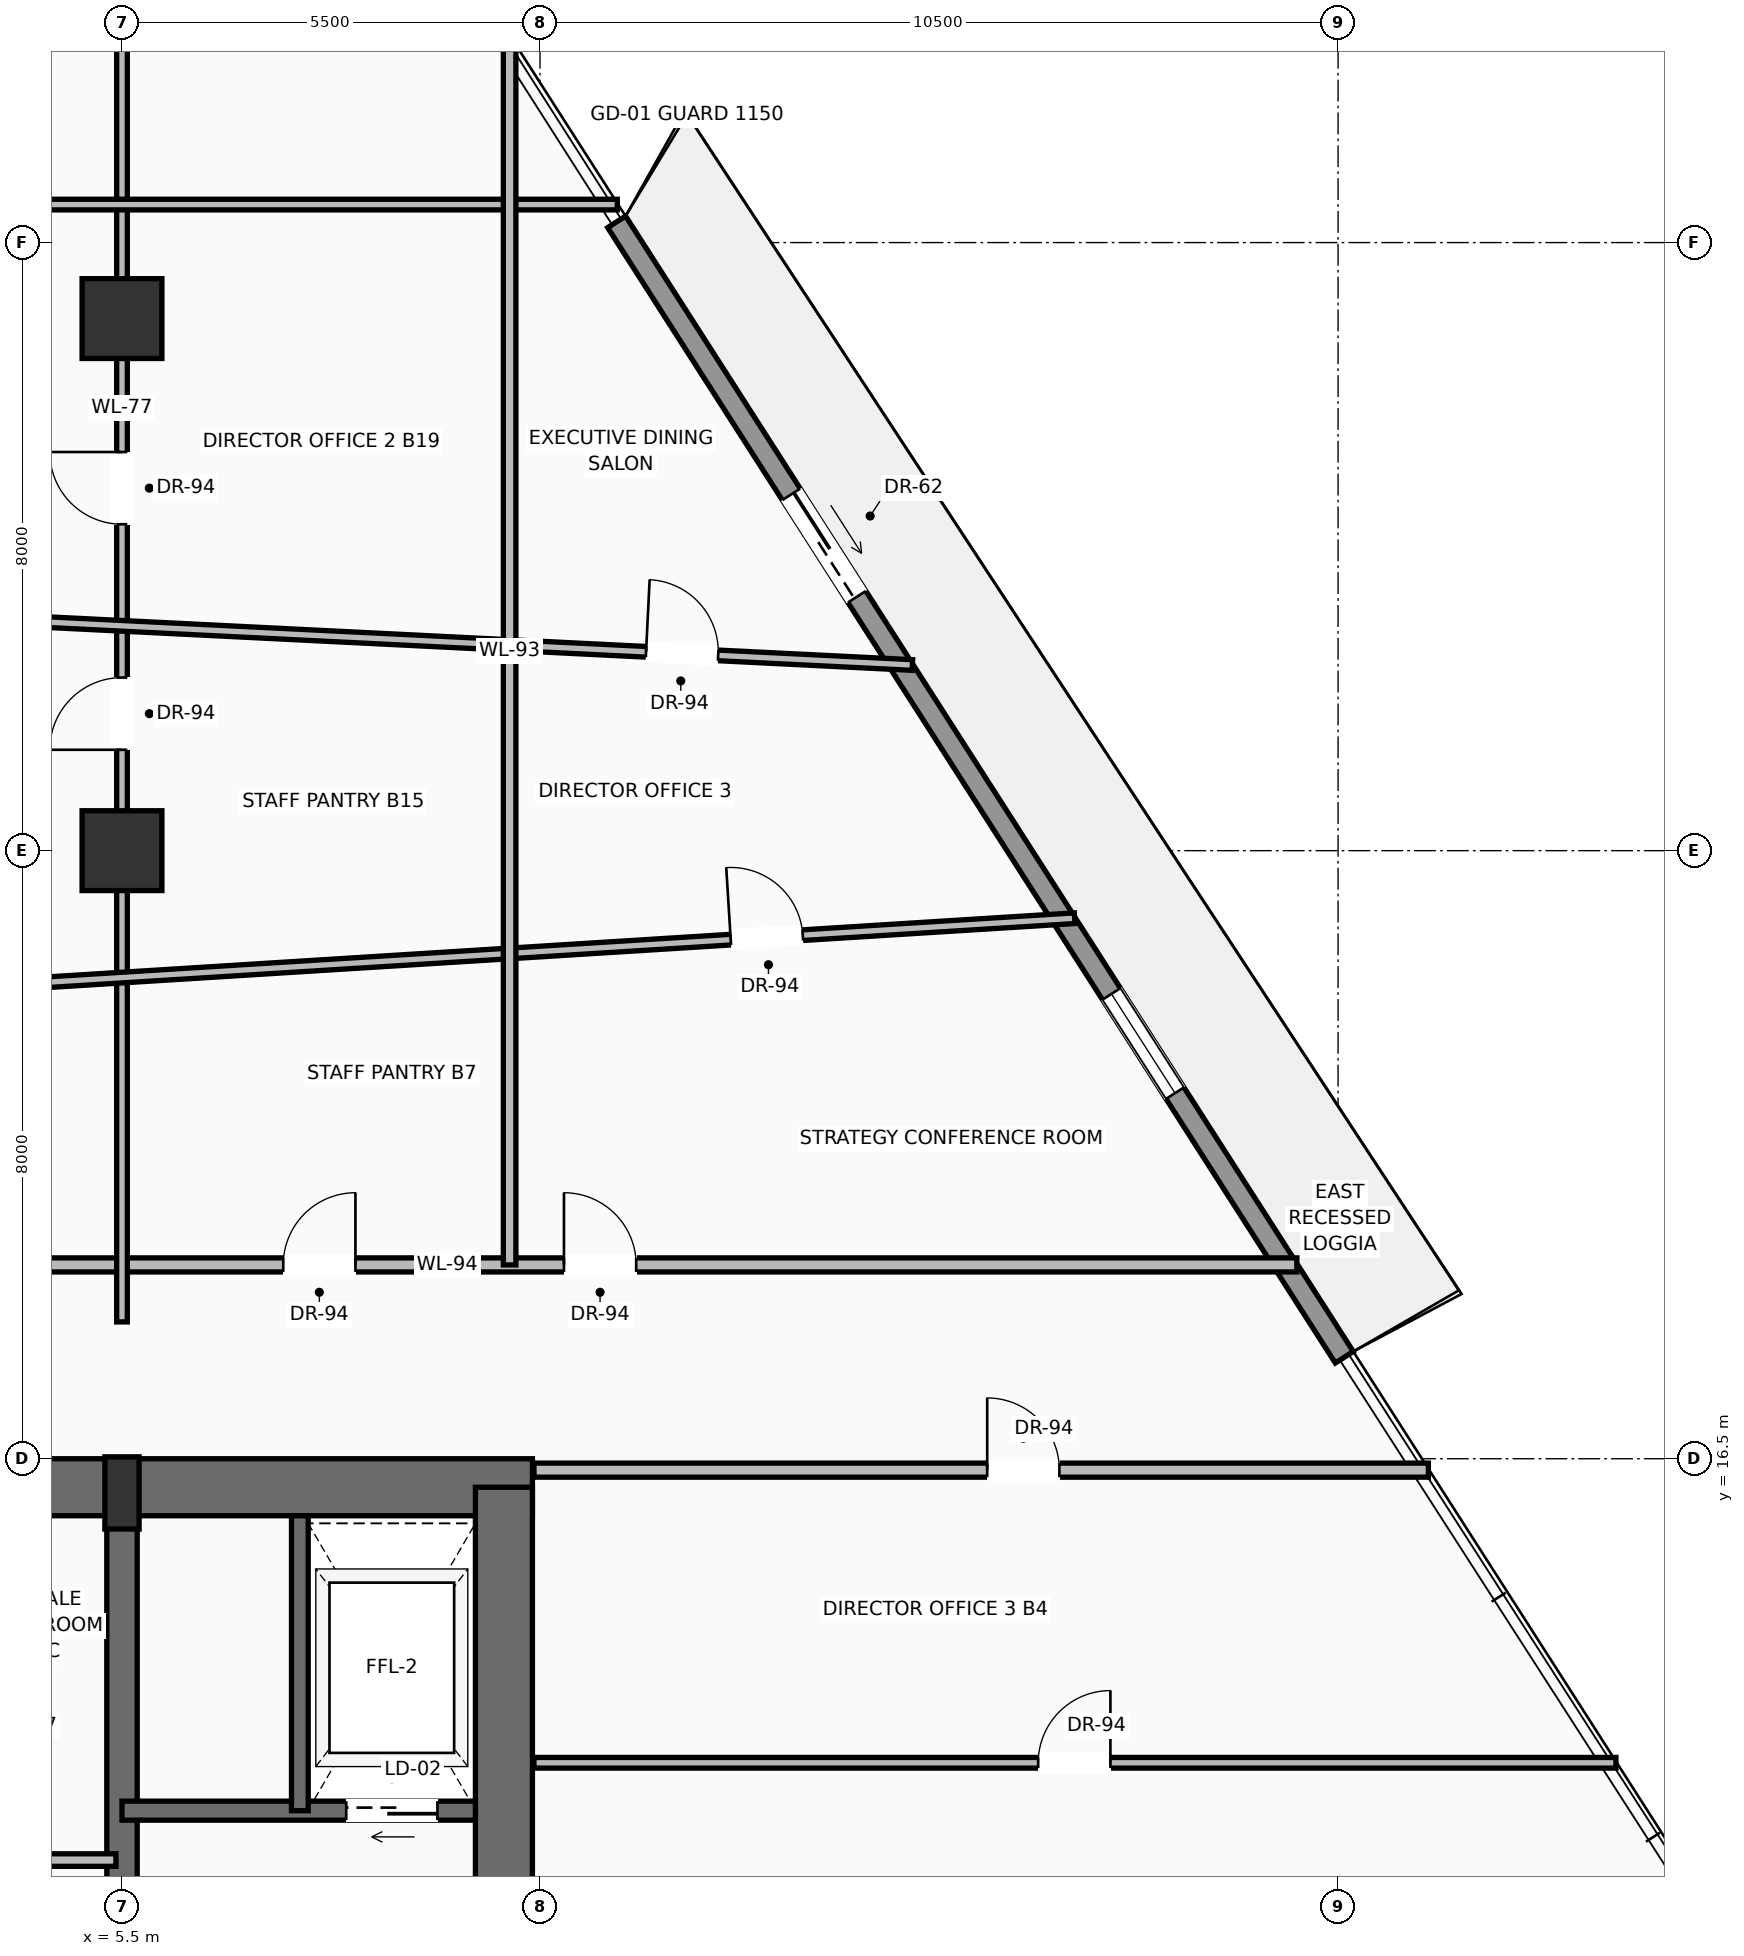
"""IFC4 building model, lengths in metres.
Left out: names, types, materials, properties, quantities, classifications, styles, units other than length and angle.
Written with IfcOpenShell. Run it as: python <this file> out.ifc"""

import sys

from ifc_helpers import new_model, si_unit, direction, frame, frame_2d, origin, origin_2d, place, context, subcontext, project, spatial, rectangle, extrude, source, transform, mapped, element, fill, save


model = new_model("IFC4")
c1 = context("Model", 3, precision=1e-05, world=origin(), true_north=direction((0.0, 1.0)))
c2 = subcontext(c1, "Body", "Model", "MODEL_VIEW")
j1 = project(units=[si_unit("LENGTHUNIT", "METRE"), si_unit("PLANEANGLEUNIT", "RADIAN")], contexts=[c1])
p1 = place(None, origin())
s1 = spatial("IfcSite", under=j1, at=p1, CompositionType="ELEMENT")
p2 = place(p1, origin())
s2 = spatial("IfcBuilding", under=s1, at=p2, CompositionType="ELEMENT")
p3 = place(p2, frame((0.0, 0.0, 117.3)))
s3 = spatial("IfcBuildingStorey", under=s2, at=p3, CompositionType="ELEMENT", Elevation=117.3)
p4 = place(p3, frame((-10.9, 16.125, 0.0), z_axis=(0.0, 0.0, 1.0), x_axis=(1.0, 0.0, 0.0)))
e1 = element("IfcWall", 1, at=p4, inside=s3, PredefinedType="SHEAR", context=c2, shape_type="SweptSolid", body=[
    extrude(rectangle(XDim=21.8, YDim=0.75, at=frame_2d((10.9, 0.0))), origin(), (0.0, 0.0, 1.0), 3.42),
])
p5 = place(p4, frame((3.47, 0.0, 0.0)))
e2 = element("IfcOpeningElement", 2, at=p5, cuts=e1, PredefinedType="OPENING", context=c2, shape_type="SweptSolid", body=[
    extrude(rectangle(XDim=1.3, YDim=2.3, at=frame_2d((0.65, 1.15))), frame((0.0, 0.385, 0.0), z_axis=(0.0, -1.0, 0.0), x_axis=(1.0, 0.0, 0.0)), (0.0, 0.0, 1.0), 0.77),
])
p6 = place(p4, frame((9.9, 0.0, 0.0)))
e3 = element("IfcOpeningElement", 3, at=p6, cuts=e1, PredefinedType="OPENING", context=c2, shape_type="SweptSolid", body=[
    extrude(rectangle(XDim=2.0, YDim=2.4, at=frame_2d((1.0, 1.2))), frame((0.0, 0.385, 0.0), z_axis=(0.0, -1.0, 0.0), x_axis=(1.0, 0.0, 0.0)), (0.0, 0.0, 1.0), 0.77),
])
p7 = place(p3, frame((10.525, 0.475, 0.0), z_axis=(0.0, 0.0, 1.0), x_axis=(0.0, 1.0, 0.0)))
e4 = element("IfcWall", 4, at=p7, inside=s3, PredefinedType="SHEAR", context=c2, shape_type="SweptSolid", body=[
    extrude(rectangle(XDim=15.65, YDim=0.75, at=frame_2d((7.825, 0.0))), origin(), (0.0, 0.0, 1.0), 3.42),
])
p8 = place(p3, frame((5.5, 0.475, 0.0), z_axis=(0.0, 0.0, 1.0), x_axis=(0.0, 1.0, 0.0)))
e5 = element("IfcWall", 5, at=p8, inside=s3, PredefinedType="SHEAR", context=c2, shape_type="SweptSolid", body=[
    extrude(rectangle(XDim=15.65, YDim=0.4, at=frame_2d((7.825, 0.0))), origin(), (0.0, 0.0, 1.0), 3.42),
])
p9 = place(p8, frame((9.025, 0.0, 0.0)))
e6 = element("IfcOpeningElement", 6, at=p9, cuts=e5, PredefinedType="OPENING", context=c2, shape_type="SweptSolid", body=[
    extrude(rectangle(XDim=1.1, YDim=2.2, at=frame_2d((0.55, 1.1))), frame((0.0, 0.21, 0.0), z_axis=(0.0, -1.0, 0.0), x_axis=(1.0, 0.0, 0.0)), (0.0, 0.0, 1.0), 0.42),
])
m1 = source(origin(), c2, "Body", "SweptSolid", [
    extrude(rectangle(XDim=0.45, YDim=0.95, at=origin_2d()), origin(), (0.0, 0.0, 1.0), 3.7),
])
p10 = place(p3, frame((5.5, 16.05, 0.0), z_axis=(0.0, 0.0, 1.0), x_axis=(1.0, 0.0, 0.0)))
e7 = element("IfcColumn", 7, at=p10, inside=s3, PredefinedType="PILASTER", context=c2, shape_type="MappedRepresentation", body=[
    mapped(m1, transform((0.0, 0.0, 0.0), scale=1.0)),
])
m2 = source(origin(), c2, "Body", "SweptSolid", [
    extrude(rectangle(XDim=1.05, YDim=1.05, at=origin_2d()), origin(), (0.0, 0.0, 1.0), 3.7),
])
for number, where, z_axis, x_axis in (
    (8, (5.5, 24.5, 0.0), (0.0, 0.0, 1.0), (1.0, 0.0, 0.0)),
    (9, (5.5, 31.5, 0.0), (0.0, 0.0, 1.0), (1.0, 0.0, 0.0)),
):
    element("IfcColumn", number, at=place(p3, frame(where, z_axis=z_axis, x_axis=x_axis)), inside=s3, PredefinedType="COLUMN", context=c2, shape_type="MappedRepresentation", body=[
        mapped(m2, transform((0.0, 0.0, 0.0), scale=1.0)),
    ])
p11 = place(p3, frame((12.008, 32.772, 0.0), z_axis=(0.0, 0.0, 1.0), x_axis=(0.539602594501, -0.841919853673, 0.0)))
e10 = element("IfcWall", 10, at=p11, inside=s3, PredefinedType="SOLIDWALL", context=c2, shape_type="SweptSolid", body=[
    extrude(rectangle(XDim=17.742, YDim=0.28, at=frame_2d((8.871, 0.0))), origin(), (0.0, 0.0, 1.0), 3.0),
])
p12 = place(p11, frame((4.258, 0.0, 0.0)))
e11 = element("IfcOpeningElement", 11, at=p12, cuts=e10, PredefinedType="OPENING", context=c2, shape_type="SweptSolid", body=[
    extrude(rectangle(XDim=1.6, YDim=2.35, at=frame_2d((0.8, 1.175))), frame((0.0, 0.15, 0.0), z_axis=(0.0, -1.0, 0.0), x_axis=(1.0, 0.0, 0.0)), (0.0, 0.0, 1.0), 0.3),
])
p13 = place(p11, frame((12.065, 0.0, 0.9)))
e12 = element("IfcOpeningElement", 12, at=p13, cuts=e10, PredefinedType="OPENING", context=c2, shape_type="SweptSolid", body=[
    extrude(rectangle(XDim=1.55, YDim=1.85, at=frame_2d((0.775, 0.925))), frame((0.0, 0.15, 0.0), z_axis=(0.0, -1.0, 0.0), x_axis=(1.0, 0.0, 0.0)), (0.0, 0.0, 1.0), 0.3),
])
p14 = place(p3, frame((10.15, 11.87, 0.0), z_axis=(0.0, 0.0, 1.0), x_axis=(-1.0, 0.0, 0.0)))
e13 = element("IfcWall", 13, at=p14, inside=s3, PredefinedType="SOLIDWALL", context=c2, shape_type="SweptSolid", body=[
    extrude(rectangle(XDim=4.65, YDim=0.25, at=frame_2d((2.325, 0.0))), origin(), (0.0, 0.0, 1.0), 3.42),
])
p15 = place(p14, frame((0.5, 0.0, 0.0)))
e14 = element("IfcOpeningElement", 14, at=p15, cuts=e13, PredefinedType="OPENING", context=c2, shape_type="SweptSolid", body=[
    extrude(rectangle(XDim=1.2, YDim=2.25, at=frame_2d((0.6, 1.125))), frame((0.0, 0.135, 0.0), z_axis=(0.0, -1.0, 0.0), x_axis=(1.0, 0.0, 0.0)), (0.0, 0.0, 1.0), 0.27),
])
p16 = place(p3, frame((7.84, 11.87, 0.0), z_axis=(0.0, 0.0, 1.0), x_axis=(0.0, 1.0, 0.0)))
e15 = element("IfcWall", 15, at=p16, inside=s3, PredefinedType="SOLIDWALL", context=c2, shape_type="SweptSolid", body=[
    extrude(rectangle(XDim=3.88, YDim=0.22, at=frame_2d((1.94, 0.0))), origin(), (0.0, 0.0, 1.0), 3.42),
])
p17 = place(p3, frame((3.54, 11.22, 0.0), z_axis=(0.0, 0.0, 1.0), x_axis=(1.0, 0.0, 0.0)))
e16 = element("IfcWall", 16, at=p17, inside=s3, PredefinedType="PARTITIONING", context=c2, shape_type="SweptSolid", body=[
    extrude(rectangle(XDim=1.88, YDim=0.165, at=frame_2d((0.94, 0.0))), origin(), (0.0, 0.0, 1.0), 3.412),
])
p18 = place(p3, frame((10.92, 16.35, 0.0), z_axis=(0.0, 0.0, 1.0), x_axis=(1.0, 0.0, 0.0)))
e17 = element("IfcWall", 17, at=p18, inside=s3, PredefinedType="PARTITIONING", context=c2, shape_type="SweptSolid", body=[
    extrude(rectangle(XDim=11.768, YDim=0.185, at=frame_2d((5.884, 0.0))), origin(), (0.0, 0.0, 1.0), 2.717),
])
p19 = place(p18, frame((5.963, 0.0, 0.0)))
e18 = element("IfcOpeningElement", 18, at=p19, cuts=e17, PredefinedType="OPENING", context=c2, shape_type="SweptSolid", body=[
    extrude(rectangle(XDim=0.95, YDim=2.2, at=frame_2d((0.475, 1.1))), frame((0.0, 0.103, 0.0), z_axis=(0.0, -1.0, 0.0), x_axis=(1.0, 0.0, 0.0)), (0.0, 0.0, 1.0), 0.205),
])
p20 = place(p3, frame((-1.4, 19.05, 0.0), z_axis=(0.0, 0.0, 1.0), x_axis=(1.0, 0.0, 0.0)))
e19 = element("IfcWall", 19, at=p20, inside=s3, PredefinedType="PARTITIONING", context=c2, shape_type="SweptSolid", body=[
    extrude(rectangle(XDim=22.357, YDim=0.185, at=frame_2d((11.179, 0.0))), origin(), (0.0, 0.0, 1.0), 2.717),
])
p21 = place(p20, frame((12.715, 0.0, 0.0)))
e20 = element("IfcOpeningElement", 20, at=p21, cuts=e19, PredefinedType="OPENING", context=c2, shape_type="SweptSolid", body=[
    extrude(rectangle(XDim=0.95, YDim=2.2, at=frame_2d((0.475, 1.1))), frame((0.0, 0.103, 0.0), z_axis=(0.0, -1.0, 0.0), x_axis=(1.0, 0.0, 0.0)), (0.0, 0.0, 1.0), 0.205),
])
p22 = place(p20, frame((3.363, 0.0, 0.0)))
e21 = element("IfcOpeningElement", 21, at=p22, cuts=e19, PredefinedType="OPENING", context=c2, shape_type="SweptSolid", body=[
    extrude(rectangle(XDim=0.95, YDim=2.2, at=frame_2d((0.475, 1.1))), frame((0.0, 0.103, 0.0), z_axis=(0.0, -1.0, 0.0), x_axis=(1.0, 0.0, 0.0)), (0.0, 0.0, 1.0), 0.205),
])
p23 = place(p20, frame((9.021, 0.0, 0.0)))
e22 = element("IfcOpeningElement", 22, at=p23, cuts=e19, PredefinedType="OPENING", context=c2, shape_type="SweptSolid", body=[
    extrude(rectangle(XDim=0.95, YDim=2.2, at=frame_2d((0.475, 1.1))), frame((0.0, 0.103, 0.0), z_axis=(0.0, -1.0, 0.0), x_axis=(1.0, 0.0, 0.0)), (0.0, 0.0, 1.0), 0.205),
])
p24 = place(p3, frame((5.5, 18.3, 0.0), z_axis=(0.0, 0.0, 1.0), x_axis=(0.0, 1.0, 0.0)))
e23 = element("IfcWall", 23, at=p24, inside=s3, PredefinedType="PARTITIONING", context=c2, shape_type="SweptSolid", body=[
    extrude(rectangle(XDim=24.043, YDim=0.14, at=frame_2d((12.022, 0.0))), origin(), (0.0, 0.0, 1.0), 2.717),
])
p25 = place(p24, frame((10.494, 0.0, 0.0)))
e24 = element("IfcOpeningElement", 24, at=p25, cuts=e23, PredefinedType="OPENING", context=c2, shape_type="SweptSolid", body=[
    extrude(rectangle(XDim=0.95, YDim=2.2, at=frame_2d((0.475, 1.1))), frame((0.0, 0.08, 0.0), z_axis=(0.0, -1.0, 0.0), x_axis=(1.0, 0.0, 0.0)), (0.0, 0.0, 1.0), 0.16),
])
p26 = place(p24, frame((18.555, 0.0, 0.0)))
e25 = element("IfcOpeningElement", 25, at=p26, cuts=e23, PredefinedType="OPENING", context=c2, shape_type="SweptSolid", body=[
    extrude(rectangle(XDim=0.95, YDim=2.2, at=frame_2d((0.475, 1.1))), frame((0.0, 0.08, 0.0), z_axis=(0.0, -1.0, 0.0), x_axis=(1.0, 0.0, 0.0)), (0.0, 0.0, 1.0), 0.16),
])
p27 = place(p24, frame((7.527, 0.0, 0.0)))
e26 = element("IfcOpeningElement", 26, at=p27, cuts=e23, PredefinedType="OPENING", context=c2, shape_type="SweptSolid", body=[
    extrude(rectangle(XDim=0.95, YDim=2.2, at=frame_2d((0.475, 1.1))), frame((0.0, 0.08, 0.0), z_axis=(0.0, -1.0, 0.0), x_axis=(1.0, 0.0, 0.0)), (0.0, 0.0, 1.0), 0.16),
])
p28 = place(p3, frame((-1.4, 22.4, 0.0), z_axis=(0.0, 0.0, 1.0), x_axis=(0.998063588678, 0.062201872609, 0.0)))
e27 = element("IfcWall", 27, at=p28, inside=s3, PredefinedType="PARTITIONING", context=c2, shape_type="SweptSolid", body=[
    extrude(rectangle(XDim=19.472, YDim=0.14, at=frame_2d((9.736, 0.0))), origin(), (0.0, 0.0, 1.0), 2.717),
])
p29 = place(p28, frame((14.938, 0.0, 0.0)))
e28 = element("IfcOpeningElement", 28, at=p29, cuts=e27, PredefinedType="OPENING", context=c2, shape_type="SweptSolid", body=[
    extrude(rectangle(XDim=0.95, YDim=2.2, at=frame_2d((0.475, 1.1))), frame((0.0, 0.08, 0.0), z_axis=(0.0, -1.0, 0.0), x_axis=(1.0, 0.0, 0.0)), (0.0, 0.0, 1.0), 0.16),
])
p30 = place(p3, frame((-1.4, 27.8, 0.0), z_axis=(0.0, 0.0, 1.0), x_axis=(0.998773235939, -0.049517907586, 0.0)))
e29 = element("IfcWall", 29, at=p30, inside=s3, PredefinedType="PARTITIONING", context=c2, shape_type="SweptSolid", body=[
    extrude(rectangle(XDim=17.32, YDim=0.14, at=frame_2d((8.66, 0.0))), origin(), (0.0, 0.0, 1.0), 2.717),
])
p31 = place(p30, frame((13.812, 0.0, 0.0)))
e30 = element("IfcOpeningElement", 30, at=p31, cuts=e29, PredefinedType="OPENING", context=c2, shape_type="SweptSolid", body=[
    extrude(rectangle(XDim=0.95, YDim=2.2, at=frame_2d((0.475, 1.1))), frame((0.0, 0.08, 0.0), z_axis=(0.0, -1.0, 0.0), x_axis=(1.0, 0.0, 0.0)), (0.0, 0.0, 1.0), 0.16),
])
p32 = place(p3, frame((-1.4, 33.0, 0.0), z_axis=(0.0, 0.0, 1.0), x_axis=(1.0, 0.0, 0.0)))
e31 = element("IfcWall", 31, at=p32, inside=s3, PredefinedType="PARTITIONING", context=c2, shape_type="SweptSolid", body=[
    extrude(rectangle(XDim=13.417, YDim=0.14, at=frame_2d((6.708, 0.0))), origin(), (0.0, 0.0, 1.0), 2.717),
])
p33 = place(p3, frame((10.6, 19.05, 0.0), z_axis=(0.0, 0.0, 1.0), x_axis=(0.0, 1.0, 0.0)))
e32 = element("IfcWall", 32, at=p33, inside=s3, PredefinedType="PARTITIONING", context=c2, shape_type="SweptSolid", body=[
    extrude(rectangle(XDim=16.16, YDim=0.165, at=frame_2d((8.08, 0.0))), origin(), (0.0, 0.0, 1.0), 2.717),
])
p34 = place(p3, frame((10.92, 12.5, 0.0), z_axis=(0.0, 0.0, 1.0), x_axis=(1.0, 0.0, 0.0)))
e33 = element("IfcWall", 33, at=p34, inside=s3, PredefinedType="PARTITIONING", context=c2, shape_type="SweptSolid", body=[
    extrude(rectangle(XDim=14.236, YDim=0.14, at=frame_2d((7.118, 0.0))), origin(), (0.0, 0.0, 1.0), 3.412),
])
p35 = place(p34, frame((6.635, 0.0, 0.0)))
e34 = element("IfcOpeningElement", 34, at=p35, cuts=e33, PredefinedType="OPENING", context=c2, shape_type="SweptSolid", body=[
    extrude(rectangle(XDim=0.95, YDim=2.2, at=frame_2d((0.475, 1.1))), frame((0.0, 0.08, 0.0), z_axis=(0.0, -1.0, 0.0), x_axis=(1.0, 0.0, 0.0)), (0.0, 0.0, 1.0), 0.16),
])
m3 = source(origin(), c2, "Body", "SweptSolid", [
    extrude(rectangle(XDim=1.6, YDim=2.35, at=frame_2d((0.8, 1.175))), frame((0.0, 0.025, 0.0), z_axis=(0.0, -1.0, 0.0), x_axis=(1.0, 0.0, 0.0)), (0.0, 0.0, 1.0), 0.05),
])
p36 = place(p12, origin())
e35 = element("IfcDoor", 35, at=p36, inside=s3, OperationType="SLIDING_TO_RIGHT", PredefinedType="DOOR", context=c2, shape_type="MappedRepresentation", body=[
    mapped(m3, transform((0.0, 0.0, 0.0), scale=1.0)),
])
fill(e11, e35)
m4 = source(origin(), c2, "Body", "SweptSolid", [
    extrude(rectangle(XDim=1.55, YDim=1.85, at=frame_2d((0.775, 0.925))), frame((0.0, 0.03, 0.0), z_axis=(0.0, -1.0, 0.0), x_axis=(1.0, 0.0, 0.0)), (0.0, 0.0, 1.0), 0.06),
])
p37 = place(p13, origin())
e36 = element("IfcWindow", 36, at=p37, inside=s3, PartitioningType="SINGLE_PANEL", PredefinedType="WINDOW", context=c2, shape_type="MappedRepresentation", body=[
    mapped(m4, transform((0.0, 0.0, 0.0), scale=1.0)),
])
fill(e12, e36)
m5 = source(origin(), c2, "Body", "SweptSolid", [
    extrude(rectangle(XDim=1.2, YDim=2.25, at=frame_2d((0.6, 1.125))), frame((0.0, 0.025, 0.0), z_axis=(0.0, -1.0, 0.0), x_axis=(1.0, 0.0, 0.0)), (0.0, 0.0, 1.0), 0.05),
])
p38 = place(p15, origin())
e37 = element("IfcDoor", 37, at=p38, inside=s3, OperationType="SLIDING_TO_RIGHT", PredefinedType="DOOR", context=c2, shape_type="MappedRepresentation", body=[
    mapped(m5, transform((0.0, 0.0, 0.0), scale=1.0)),
])
fill(e14, e37)
m6 = source(origin(), c2, "Body", "SweptSolid", [
    extrude(rectangle(XDim=0.95, YDim=2.2, at=frame_2d((0.475, 1.1))), frame((0.0, 0.025, 0.0), z_axis=(0.0, -1.0, 0.0), x_axis=(1.0, 0.0, 0.0)), (0.0, 0.0, 1.0), 0.05),
])
p39 = place(p19, origin())
e38 = element("IfcDoor", 38, at=p39, inside=s3, OperationType="SINGLE_SWING_LEFT", PredefinedType="DOOR", context=c2, shape_type="MappedRepresentation", body=[
    mapped(m6, transform((0.0, 0.0, 0.0), scale=1.0)),
])
fill(e18, e38)
p40 = place(p21, origin())
e39 = element("IfcDoor", 39, at=p40, inside=s3, OperationType="SINGLE_SWING_LEFT", PredefinedType="DOOR", context=c2, shape_type="MappedRepresentation", body=[
    mapped(m6, transform((0.0, 0.0, 0.0), scale=1.0)),
])
fill(e20, e39)
p41 = place(p35, origin())
e40 = element("IfcDoor", 40, at=p41, inside=s3, OperationType="SINGLE_SWING_RIGHT", PredefinedType="DOOR", context=c2, shape_type="MappedRepresentation", body=[
    mapped(m6, transform((0.0, 0.0, 0.0), scale=1.0)),
])
fill(e34, e40)
p42 = place(p23, origin())
e41 = element("IfcDoor", 41, at=p42, inside=s3, OperationType="SINGLE_SWING_RIGHT", PredefinedType="DOOR", context=c2, shape_type="MappedRepresentation", body=[
    mapped(m6, transform((0.0, 0.0, 0.0), scale=1.0)),
])
fill(e22, e41)
p43 = place(p29, origin())
e42 = element("IfcDoor", 42, at=p43, inside=s3, OperationType="SINGLE_SWING_LEFT", PredefinedType="DOOR", context=c2, shape_type="MappedRepresentation", body=[
    mapped(m6, transform((0.0, 0.0, 0.0), scale=1.0)),
])
fill(e28, e42)
p44 = place(p25, origin())
e43 = element("IfcDoor", 43, at=p44, inside=s3, OperationType="SINGLE_SWING_RIGHT", PredefinedType="DOOR", context=c2, shape_type="MappedRepresentation", body=[
    mapped(m6, transform((0.0, 0.0, 0.0), scale=1.0)),
])
fill(e24, e43)
p45 = place(p27, origin())
e44 = element("IfcDoor", 44, at=p45, inside=s3, OperationType="SINGLE_SWING_LEFT", PredefinedType="DOOR", context=c2, shape_type="MappedRepresentation", body=[
    mapped(m6, transform((0.0, 0.0, 0.0), scale=1.0)),
])
fill(e26, e44)
p46 = place(p31, origin())
e45 = element("IfcDoor", 45, at=p46, inside=s3, OperationType="SINGLE_SWING_LEFT", PredefinedType="DOOR", context=c2, shape_type="MappedRepresentation", body=[
    mapped(m6, transform((0.0, 0.0, 0.0), scale=1.0)),
])
fill(e30, e45)
save(model, sys.argv[1])
